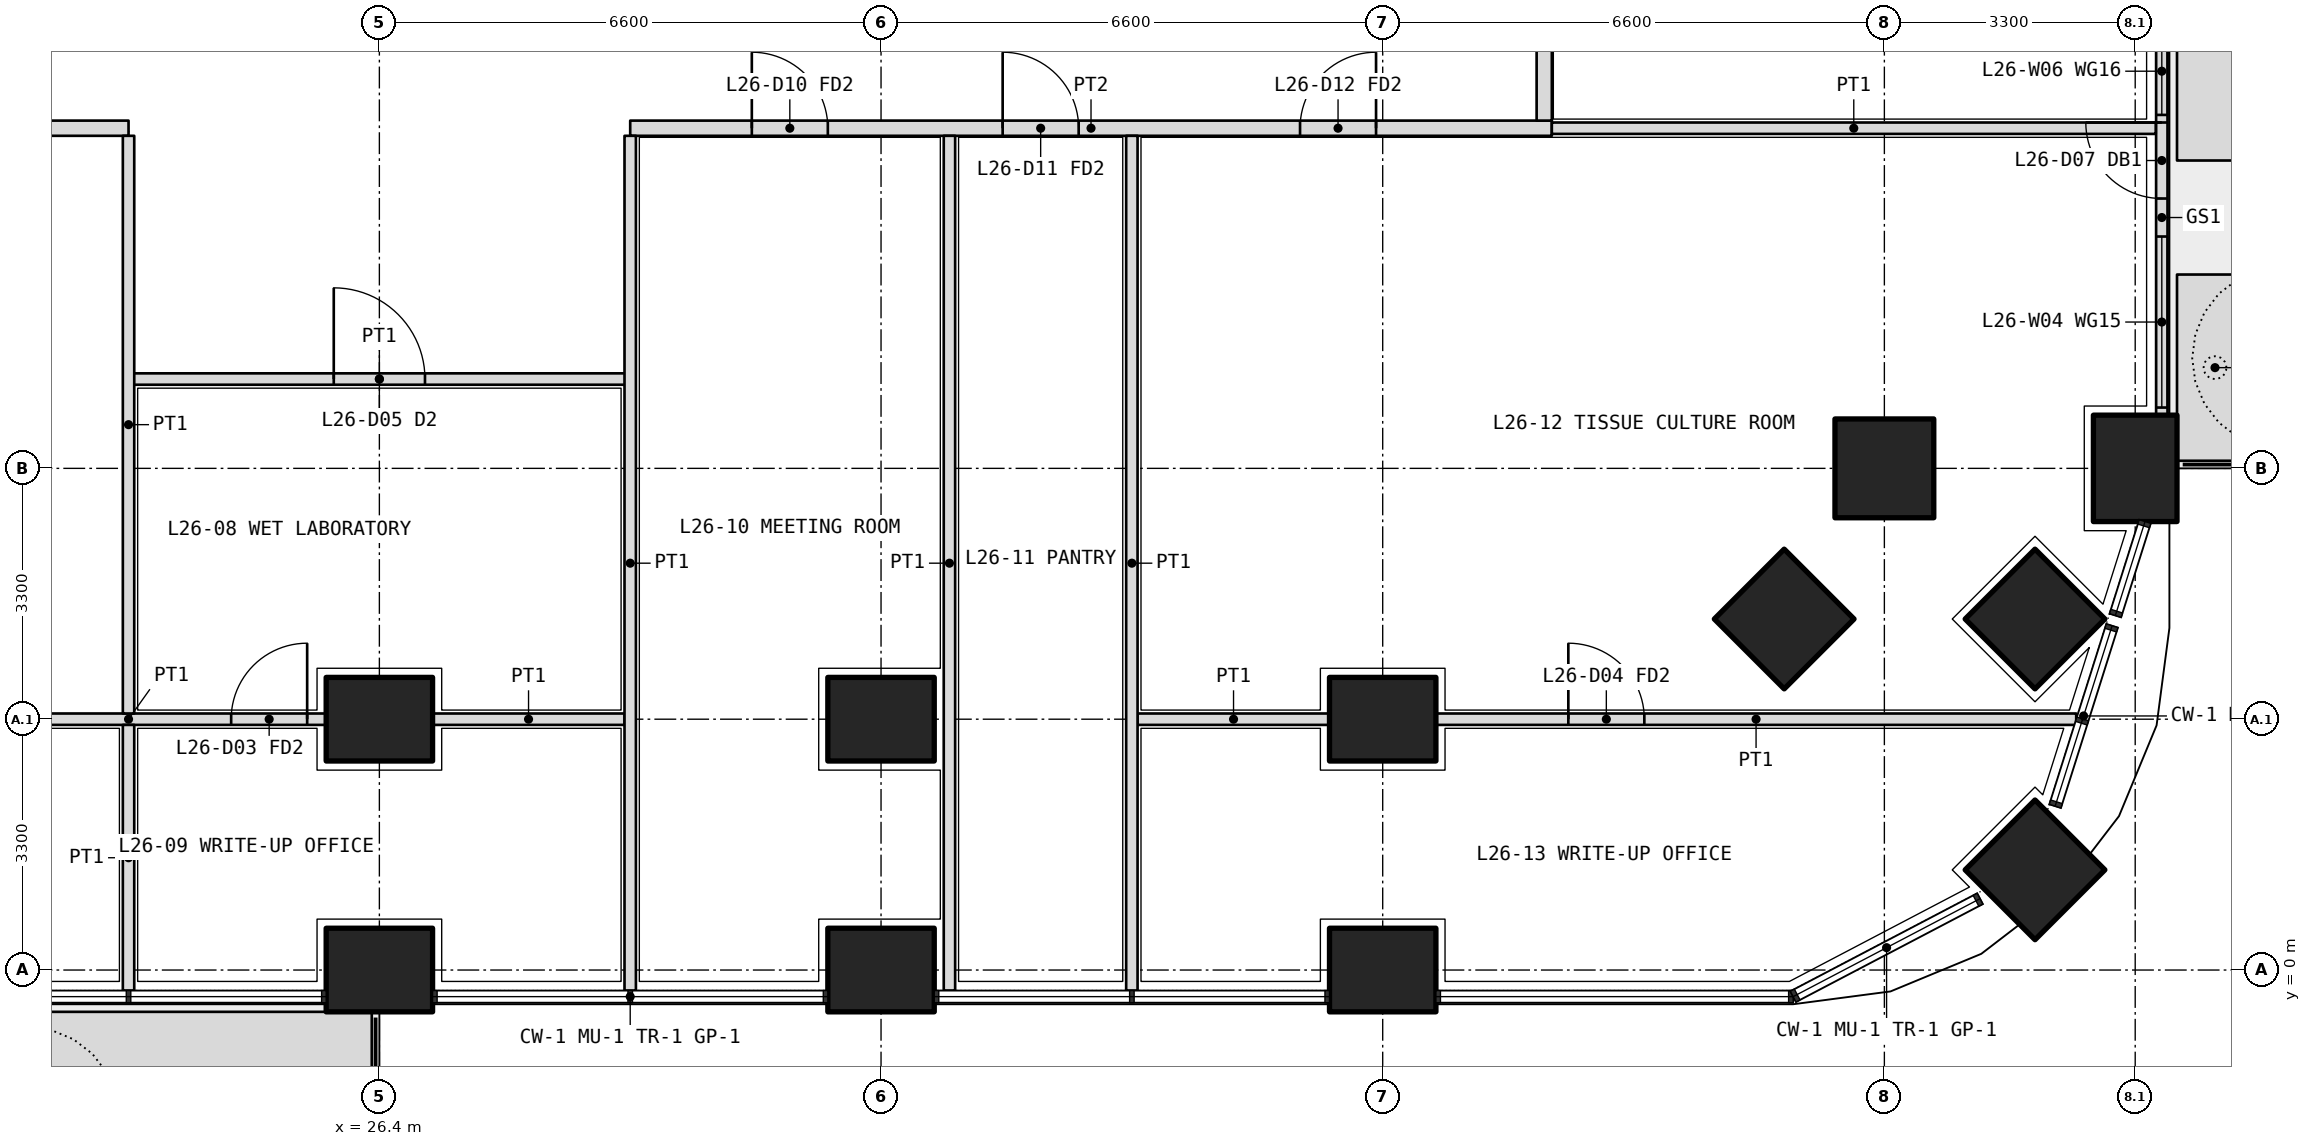
"""IFC4 building model, lengths in metres.
Left out: names, types, materials, properties, quantities, classifications, styles, units other than length and angle.
Written with IfcOpenShell. Run it as: python <this file> out.ifc"""

import sys

from ifc_helpers import new_model, si_unit, direction, frame, frame_2d, origin, origin_2d, place, context, subcontext, project, spatial, polyline, rectangle, outline, extrude, element, fill, save


model = new_model("IFC4")
c1 = context("Model", 3, precision=1e-05, world=origin(), true_north=direction((0.0, 1.0)))
c2 = subcontext(c1, "Body", "Model", "MODEL_VIEW")
j1 = project(units=[si_unit("LENGTHUNIT", "METRE"), si_unit("PLANEANGLEUNIT", "RADIAN")], contexts=[c1])
p1 = place(None, origin())
s1 = spatial("IfcSite", under=j1, at=p1, CompositionType="ELEMENT")
p2 = place(p1, origin())
s2 = spatial("IfcBuilding", under=s1, at=p2, CompositionType="ELEMENT")
p3 = place(p2, frame((0.0, 0.0, 115.8)))
s3 = spatial("IfcBuildingStorey", under=s2, at=p3, CompositionType="ELEMENT", Elevation=115.8)
p4 = place(p3, frame((48.182, 1.318, 0.0), z_axis=(0.0, 0.0, 1.0), x_axis=(0.707106781187, 0.707106781187, 0.0)))
e1 = element("IfcColumn", 1, at=p4, inside=s3, PredefinedType="COLUMN", context=c2, shape_type="SweptSolid", body=[
    extrude(rectangle(XDim=1.3, YDim=1.3, at=origin_2d()), origin(), (0.0, 0.0, 1.0), 4.2),
])
for number, where, z_axis, x_axis in (
    (2, (26.4, 0.0, 0.0), (0.0, 0.0, 1.0), (1.0, 0.0, 0.0)),
    (3, (33.0, 0.0, 0.0), (0.0, 0.0, 1.0), (1.0, 0.0, 0.0)),
    (4, (39.6, 0.0, 0.0), (0.0, 0.0, 1.0), (1.0, 0.0, 0.0)),
    (5, (49.5, 6.6, 0.0), (0.0, 0.0, 1.0), (0.0, 1.0, 0.0)),
):
    element("IfcColumn", number, at=place(p3, frame(where, z_axis=z_axis, x_axis=x_axis)), inside=s3, PredefinedType="COLUMN", context=c2, shape_type="SweptSolid", body=[
        extrude(rectangle(XDim=1.4, YDim=1.1, at=origin_2d()), origin(), (0.0, 0.0, 1.0), 4.2),
    ])
for number, where, z_axis, x_axis in (
    (6, (46.2, 6.6, 0.0), (0.0, 0.0, 1.0), (1.0, 0.0, 0.0)),
    (7, (48.182, 4.618, 0.0), (0.0, 0.0, 1.0), (0.707, 0.707, 0.0)),
):
    element("IfcColumn", number, at=place(p3, frame(where, z_axis=z_axis, x_axis=x_axis)), inside=s3, PredefinedType="COLUMN", context=c2, shape_type="SweptSolid", body=[
        extrude(rectangle(XDim=1.3, YDim=1.3, at=origin_2d()), origin(), (0.0, 0.0, 1.0), 4.2),
    ])
for number, where, z_axis, x_axis in (
    (8, (26.4, 3.3, 0.0), (0.0, 0.0, 1.0), (1.0, 0.0, 0.0)),
    (9, (33.0, 3.3, 0.0), (0.0, 0.0, 1.0), (1.0, 0.0, 0.0)),
    (10, (39.6, 3.3, 0.0), (0.0, 0.0, 1.0), (1.0, 0.0, 0.0)),
):
    element("IfcColumn", number, at=place(p3, frame(where, z_axis=z_axis, x_axis=x_axis)), inside=s3, PredefinedType="COLUMN", context=c2, shape_type="SweptSolid", body=[
        extrude(rectangle(XDim=1.4, YDim=1.1, at=origin_2d()), origin(), (0.0, 0.0, 1.0), 4.2),
    ])
p5 = place(p3, frame((44.882, 4.618, 0.0), z_axis=(0.0, 0.0, 1.0), x_axis=(0.707106781187, 0.707106781187, 0.0)))
e11 = element("IfcColumn", 11, at=p5, inside=s3, PredefinedType="COLUMN", context=c2, shape_type="SweptSolid", body=[
    extrude(rectangle(XDim=1.3, YDim=1.3, at=origin_2d()), origin(), (0.0, 0.0, 1.0), 4.2),
])
p6 = place(p3, origin())
e12 = element("IfcWall", 12, at=p6, inside=s3, PredefinedType="USERDEFINED", context=c2, shape_type="SweptSolid", body=[
    extrude(outline(polyline([(17.25, -1.55), (26.3, -1.55), (26.3, -0.55), (17.25, -0.55), (17.25, -1.55)]), holes=[polyline([(17.4, -1.4), (26.15, -1.4), (26.15, -0.7), (17.4, -0.7), (17.4, -1.4)])]), origin(), (0.0, 0.0, 1.0), 1.05),
])
p7 = place(p3, origin())
e13 = element("IfcWall", 13, at=p7, inside=s3, PredefinedType="USERDEFINED", context=c2, shape_type="SweptSolid", body=[
    extrude(outline(polyline([(50.05, 6.7), (51.05, 6.7), (51.05, 9.15), (50.05, 9.15), (50.05, 6.7)]), holes=[polyline([(50.2, 6.85), (50.9, 6.85), (50.9, 9.0), (50.2, 9.0), (50.2, 6.85)])]), origin(), (0.0, 0.0, 1.0), 1.05),
])
p8 = place(p3, origin())
e14 = element("IfcWall", 14, at=p8, inside=s3, PredefinedType="USERDEFINED", context=c2, shape_type="SweptSolid", body=[
    extrude(outline(polyline([(50.05, 10.65), (51.05, 10.65), (51.05, 19.7), (50.05, 19.7), (50.05, 10.65)]), holes=[polyline([(50.2, 10.8), (50.9, 10.8), (50.9, 19.55), (50.2, 19.55), (50.2, 10.8)])]), origin(), (0.0, 0.0, 1.0), 1.05),
])
p9 = place(p3, frame((49.85, 7.3, 0.0), z_axis=(0.0, 0.0, 1.0), x_axis=(0.0, 1.0, 0.0)))
e15 = element("IfcWall", 15, at=p9, inside=s3, PredefinedType="SOLIDWALL", context=c2, shape_type="SweptSolid", body=[
    extrude(rectangle(XDim=5.2, YDim=0.15, at=frame_2d((2.6, 0.0))), origin(), (0.0, 0.0, 1.0), 2.7),
])
p10 = place(p9, frame((2.85, 0.0, 0.0)))
e16 = element("IfcOpeningElement", 16, at=p10, cuts=e15, PredefinedType="OPENING", context=c2, shape_type="SweptSolid", body=[
    extrude(rectangle(XDim=1.0, YDim=2.4, at=frame_2d((0.5, 1.2))), frame((0.0, 0.085, 0.0), z_axis=(0.0, -1.0, 0.0), x_axis=(1.0, 0.0, 0.0)), (0.0, 0.0, 1.0), 0.17),
])
p11 = place(p9, frame((0.1, 0.0, 0.1)))
e17 = element("IfcOpeningElement", 17, at=p11, cuts=e15, PredefinedType="OPENING", context=c2, shape_type="SweptSolid", body=[
    extrude(rectangle(XDim=2.25, YDim=2.3, at=frame_2d((1.125, 1.15))), frame((0.0, 0.085, 0.0), z_axis=(0.0, -1.0, 0.0), x_axis=(1.0, 0.0, 0.0)), (0.0, 0.0, 1.0), 0.17),
])
p12 = place(p9, frame((3.95, 0.0, 0.1)))
e18 = element("IfcOpeningElement", 18, at=p12, cuts=e15, PredefinedType="OPENING", context=c2, shape_type="SweptSolid", body=[
    extrude(rectangle(XDim=1.15, YDim=2.3, at=frame_2d((0.575, 1.15))), frame((0.0, 0.085, 0.0), z_axis=(0.0, -1.0, 0.0), x_axis=(1.0, 0.0, 0.0)), (0.0, 0.0, 1.0), 0.17),
])
p13 = place(p3, frame((10.975, 11.075, 0.0), z_axis=(0.0, 0.0, 1.0), x_axis=(1.0, 0.0, 0.0)))
e19 = element("IfcWall", 19, at=p13, inside=s3, PredefinedType="PARTITIONING", context=c2, shape_type="SweptSolid", body=[
    extrude(rectangle(XDim=12.125, YDim=0.2, at=frame_2d((6.062, 0.0))), origin(), (0.0, 0.0, 1.0), 2.85),
])
p14 = place(p13, frame((0.663, 0.0, 0.0)))
e20 = element("IfcOpeningElement", 20, at=p14, cuts=e19, PredefinedType="OPENING", context=c2, shape_type="SweptSolid", body=[
    extrude(rectangle(XDim=1.0, YDim=2.1, at=frame_2d((0.5, 1.05))), frame((0.0, 0.11, 0.0), z_axis=(0.0, -1.0, 0.0), x_axis=(1.0, 0.0, 0.0)), (0.0, 0.0, 1.0), 0.22),
])
p15 = place(p13, frame((6.675, 0.0, 0.0)))
e21 = element("IfcOpeningElement", 21, at=p15, cuts=e19, PredefinedType="OPENING", context=c2, shape_type="SweptSolid", body=[
    extrude(rectangle(XDim=1.0, YDim=2.1, at=frame_2d((0.5, 1.05))), frame((0.0, 0.11, 0.0), z_axis=(0.0, -1.0, 0.0), x_axis=(1.0, 0.0, 0.0)), (0.0, 0.0, 1.0), 0.22),
])
p16 = place(p3, frame((29.7, 11.075, 0.0), z_axis=(0.0, 0.0, 1.0), x_axis=(1.0, 0.0, 0.0)))
e22 = element("IfcWall", 22, at=p16, inside=s3, PredefinedType="PARTITIONING", context=c2, shape_type="SweptSolid", body=[
    extrude(rectangle(XDim=12.125, YDim=0.2, at=frame_2d((6.062, 0.0))), origin(), (0.0, 0.0, 1.0), 2.85),
])
p17 = place(p16, frame((1.6, 0.0, 0.0)))
e23 = element("IfcOpeningElement", 23, at=p17, cuts=e22, PredefinedType="OPENING", context=c2, shape_type="SweptSolid", body=[
    extrude(rectangle(XDim=1.0, YDim=2.1, at=frame_2d((0.5, 1.05))), frame((0.0, 0.11, 0.0), z_axis=(0.0, -1.0, 0.0), x_axis=(1.0, 0.0, 0.0)), (0.0, 0.0, 1.0), 0.22),
])
p18 = place(p16, frame((4.9, 0.0, 0.0)))
e24 = element("IfcOpeningElement", 24, at=p18, cuts=e22, PredefinedType="OPENING", context=c2, shape_type="SweptSolid", body=[
    extrude(rectangle(XDim=1.0, YDim=2.1, at=frame_2d((0.5, 1.05))), frame((0.0, 0.11, 0.0), z_axis=(0.0, -1.0, 0.0), x_axis=(1.0, 0.0, 0.0)), (0.0, 0.0, 1.0), 0.22),
])
p19 = place(p16, frame((8.812, 0.0, 0.0)))
e25 = element("IfcOpeningElement", 25, at=p19, cuts=e22, PredefinedType="OPENING", context=c2, shape_type="SweptSolid", body=[
    extrude(rectangle(XDim=1.0, YDim=2.1, at=frame_2d((0.5, 1.05))), frame((0.0, 0.11, 0.0), z_axis=(0.0, -1.0, 0.0), x_axis=(1.0, 0.0, 0.0)), (0.0, 0.0, 1.0), 0.22),
])
p20 = place(p3, frame((41.725, 11.175, 0.0), z_axis=(0.0, 0.0, 1.0), x_axis=(0.0, 1.0, 0.0)))
e26 = element("IfcWall", 26, at=p20, inside=s3, PredefinedType="PARTITIONING", context=c2, shape_type="SweptSolid", body=[
    extrude(rectangle(XDim=27.625, YDim=0.2, at=frame_2d((13.812, 0.0))), origin(), (0.0, 0.0, 1.0), 2.85),
])
p21 = place(p20, frame((3.762, 0.0, 0.0)))
e27 = element("IfcOpeningElement", 27, at=p21, cuts=e26, PredefinedType="OPENING", context=c2, shape_type="SweptSolid", body=[
    extrude(rectangle(XDim=1.0, YDim=2.1, at=frame_2d((0.5, 1.05))), frame((0.0, 0.11, 0.0), z_axis=(0.0, -1.0, 0.0), x_axis=(1.0, 0.0, 0.0)), (0.0, 0.0, 1.0), 0.22),
])
p22 = place(p20, frame((9.625, 0.0, 0.0)))
e28 = element("IfcOpeningElement", 28, at=p22, cuts=e26, PredefinedType="OPENING", context=c2, shape_type="SweptSolid", body=[
    extrude(rectangle(XDim=1.0, YDim=2.1, at=frame_2d((0.5, 1.05))), frame((0.0, 0.11, 0.0), z_axis=(0.0, -1.0, 0.0), x_axis=(1.0, 0.0, 0.0)), (0.0, 0.0, 1.0), 0.22),
])
p23 = place(p20, frame((12.975, 0.0, 0.0)))
e29 = element("IfcOpeningElement", 29, at=p23, cuts=e26, PredefinedType="OPENING", context=c2, shape_type="SweptSolid", body=[
    extrude(rectangle(XDim=0.9, YDim=2.1, at=frame_2d((0.45, 1.05))), frame((0.0, 0.11, 0.0), z_axis=(0.0, -1.0, 0.0), x_axis=(1.0, 0.0, 0.0)), (0.0, 0.0, 1.0), 0.22),
])
p24 = place(p20, frame((19.675, 0.0, 0.0)))
e30 = element("IfcOpeningElement", 30, at=p24, cuts=e26, PredefinedType="OPENING", context=c2, shape_type="SweptSolid", body=[
    extrude(rectangle(XDim=1.0, YDim=2.1, at=frame_2d((0.5, 1.05))), frame((0.0, 0.11, 0.0), z_axis=(0.0, -1.0, 0.0), x_axis=(1.0, 0.0, 0.0)), (0.0, 0.0, 1.0), 0.22),
])
p25 = place(p20, frame((25.925, 0.0, 0.0)))
e31 = element("IfcOpeningElement", 31, at=p25, cuts=e26, PredefinedType="OPENING", context=c2, shape_type="SweptSolid", body=[
    extrude(rectangle(XDim=1.0, YDim=2.1, at=frame_2d((0.5, 1.05))), frame((0.0, 0.11, 0.0), z_axis=(0.0, -1.0, 0.0), x_axis=(1.0, 0.0, 0.0)), (0.0, 0.0, 1.0), 0.22),
])
p26 = place(p3, frame((49.77, 11.075, 0.0), z_axis=(0.0, 0.0, 1.0), x_axis=(-1.0, 0.0, 0.0)))
e32 = element("IfcWall", 32, at=p26, inside=s3, PredefinedType="PARTITIONING", context=c2, shape_type="SweptSolid", body=[
    extrude(rectangle(XDim=7.945, YDim=0.15, at=frame_2d((3.973, 0.0))), origin(), (0.0, 0.0, 1.0), 2.7),
])
p27 = place(p3, frame((20.5, 3.3, 0.0), z_axis=(0.0, 0.0, 1.0), x_axis=(1.0, 0.0, 0.0)))
e33 = element("IfcWall", 33, at=p27, inside=s3, PredefinedType="PARTITIONING", context=c2, shape_type="SweptSolid", body=[
    extrude(rectangle(XDim=5.2, YDim=0.15, at=frame_2d((2.6, 0.0))), origin(), (0.0, 0.0, 1.0), 3.9),
])
p28 = place(p27, frame((3.95, 0.0, 0.0)))
e34 = element("IfcOpeningElement", 34, at=p28, cuts=e33, PredefinedType="OPENING", context=c2, shape_type="SweptSolid", body=[
    extrude(rectangle(XDim=1.0, YDim=2.1, at=frame_2d((0.5, 1.05))), frame((0.0, 0.085, 0.0), z_axis=(0.0, -1.0, 0.0), x_axis=(1.0, 0.0, 0.0)), (0.0, 0.0, 1.0), 0.17),
])
for number, where, z_axis, x_axis in (
    (35, (27.1, 3.3, 0.0), (0.0, 0.0, 1.0), (1.0, 0.0, 0.0)),
    (36, (36.375, 3.3, 0.0), (0.0, 0.0, 1.0), (1.0, 0.0, 0.0)),
):
    element("IfcWall", number, at=place(p3, frame(where, z_axis=z_axis, x_axis=x_axis)), inside=s3, PredefinedType="PARTITIONING", context=c2, shape_type="SweptSolid", body=[
        extrude(rectangle(XDim=2.525, YDim=0.15, at=frame_2d((1.262, 0.0))), origin(), (0.0, 0.0, 1.0), 3.9),
    ])
p29 = place(p3, frame((40.3, 3.3, 0.0), z_axis=(0.0, 0.0, 1.0), x_axis=(1.0, 0.0, 0.0)))
e37 = element("IfcWall", 37, at=p29, inside=s3, PredefinedType="PARTITIONING", context=c2, shape_type="SweptSolid", body=[
    extrude(rectangle(XDim=8.424, YDim=0.15, at=frame_2d((4.212, 0.0))), origin(), (0.0, 0.0, 1.0), 2.7),
])
p30 = place(p29, frame((1.742, 0.0, 0.0)))
e38 = element("IfcOpeningElement", 38, at=p30, cuts=e37, PredefinedType="OPENING", context=c2, shape_type="SweptSolid", body=[
    extrude(rectangle(XDim=1.0, YDim=2.1, at=frame_2d((0.5, 1.05))), frame((0.0, 0.085, 0.0), z_axis=(0.0, -1.0, 0.0), x_axis=(1.0, 0.0, 0.0)), (0.0, 0.0, 1.0), 0.17),
])
p31 = place(p3, frame((23.1, 7.775, 0.0), z_axis=(0.0, 0.0, 1.0), x_axis=(1.0, 0.0, 0.0)))
e39 = element("IfcWall", 39, at=p31, inside=s3, PredefinedType="PARTITIONING", context=c2, shape_type="SweptSolid", body=[
    extrude(rectangle(XDim=6.6, YDim=0.15, at=frame_2d((3.3, 0.0))), origin(), (0.0, 0.0, 1.0), 2.85),
])
p32 = place(p31, frame((2.7, 0.0, 0.0)))
e40 = element("IfcOpeningElement", 40, at=p32, cuts=e39, PredefinedType="OPENING", context=c2, shape_type="SweptSolid", body=[
    extrude(rectangle(XDim=1.2, YDim=2.1, at=frame_2d((0.6, 1.05))), frame((0.0, 0.085, 0.0), z_axis=(0.0, -1.0, 0.0), x_axis=(1.0, 0.0, 0.0)), (0.0, 0.0, 1.0), 0.17),
])
for number, where, z_axis, x_axis in (
    (41, (33.9, -0.27, 0.0), (0.0, 0.0, 1.0), (0.0, 1.0, 0.0)),
    (42, (36.3, -0.27, 0.0), (0.0, 0.0, 1.0), (0.0, 1.0, 0.0)),
):
    element("IfcWall", number, at=place(p3, frame(where, z_axis=z_axis, x_axis=x_axis)), inside=s3, PredefinedType="PARTITIONING", context=c2, shape_type="SweptSolid", body=[
        extrude(rectangle(XDim=11.245, YDim=0.15, at=frame_2d((5.623, 0.0))), origin(), (0.0, 0.0, 1.0), 2.7),
    ])
p33 = place(p3, frame((23.1, -0.27, 0.0), z_axis=(0.0, 0.0, 1.0), x_axis=(0.0, 1.0, 0.0)))
e43 = element("IfcWall", 43, at=p33, inside=s3, PredefinedType="PARTITIONING", context=c2, shape_type="SweptSolid", body=[
    extrude(rectangle(XDim=3.495, YDim=0.15, at=frame_2d((1.748, 0.0))), origin(), (0.0, 0.0, 1.0), 2.7),
])
p34 = place(p3, frame((23.1, 3.375, 0.0), z_axis=(0.0, 0.0, 1.0), x_axis=(0.0, 1.0, 0.0)))
e44 = element("IfcWall", 44, at=p34, inside=s3, PredefinedType="PARTITIONING", context=c2, shape_type="SweptSolid", body=[
    extrude(rectangle(XDim=7.6, YDim=0.15, at=frame_2d((3.8, 0.0))), origin(), (0.0, 0.0, 1.0), 3.9),
])
p35 = place(p3, frame((29.7, -0.27, 0.0), z_axis=(0.0, 0.0, 1.0), x_axis=(0.0, 1.0, 0.0)))
e45 = element("IfcWall", 45, at=p35, inside=s3, PredefinedType="PARTITIONING", context=c2, shape_type="SweptSolid", body=[
    extrude(rectangle(XDim=11.245, YDim=0.15, at=frame_2d((5.623, 0.0))), origin(), (0.0, 0.0, 1.0), 2.7),
])
p36 = place(p10, origin())
e46 = element("IfcDoor", 46, at=p36, inside=s3, OperationType="SINGLE_SWING_RIGHT", PredefinedType="DOOR", context=c2, shape_type="SweptSolid", body=[
    extrude(rectangle(XDim=1.0, YDim=2.4, at=frame_2d((0.5, 1.2))), frame((0.0, 0.025, 0.0), z_axis=(0.0, -1.0, 0.0), x_axis=(1.0, 0.0, 0.0)), (0.0, 0.0, 1.0), 0.05),
])
fill(e16, e46)
p37 = place(p11, origin())
e47 = element("IfcWindow", 47, at=p37, inside=s3, PartitioningType="SINGLE_PANEL", PredefinedType="WINDOW", context=c2, shape_type="SweptSolid", body=[
    extrude(rectangle(XDim=2.25, YDim=2.3, at=frame_2d((1.125, 1.15))), frame((0.0, 0.03, 0.0), z_axis=(0.0, -1.0, 0.0), x_axis=(1.0, 0.0, 0.0)), (0.0, 0.0, 1.0), 0.06),
])
fill(e17, e47)
p38 = place(p12, origin())
e48 = element("IfcWindow", 48, at=p38, inside=s3, PartitioningType="SINGLE_PANEL", PredefinedType="WINDOW", context=c2, shape_type="SweptSolid", body=[
    extrude(rectangle(XDim=1.15, YDim=2.3, at=frame_2d((0.575, 1.15))), frame((0.0, 0.03, 0.0), z_axis=(0.0, -1.0, 0.0), x_axis=(1.0, 0.0, 0.0)), (0.0, 0.0, 1.0), 0.06),
])
fill(e18, e48)
p39 = place(p32, origin())
e49 = element("IfcDoor", 49, at=p39, inside=s3, OperationType="DOUBLE_DOOR_SINGLE_SWING", PredefinedType="DOOR", context=c2, shape_type="SweptSolid", body=[
    extrude(rectangle(XDim=1.2, YDim=2.1, at=frame_2d((0.6, 1.05))), frame((0.0, 0.025, 0.0), z_axis=(0.0, -1.0, 0.0), x_axis=(1.0, 0.0, 0.0)), (0.0, 0.0, 1.0), 0.05),
])
fill(e40, e49)
p40 = place(p28, origin())
e50 = element("IfcDoor", 50, at=p40, inside=s3, OperationType="SINGLE_SWING_RIGHT", PredefinedType="DOOR", context=c2, shape_type="SweptSolid", body=[
    extrude(rectangle(XDim=1.0, YDim=2.1, at=frame_2d((0.5, 1.05))), frame((0.0, 0.025, 0.0), z_axis=(0.0, -1.0, 0.0), x_axis=(1.0, 0.0, 0.0)), (0.0, 0.0, 1.0), 0.05),
])
fill(e34, e50)
p41 = place(p17, origin())
e51 = element("IfcDoor", 51, at=p41, inside=s3, OperationType="SINGLE_SWING_LEFT", PredefinedType="DOOR", context=c2, shape_type="SweptSolid", body=[
    extrude(rectangle(XDim=1.0, YDim=2.1, at=frame_2d((0.5, 1.05))), frame((0.0, 0.025, 0.0), z_axis=(0.0, -1.0, 0.0), x_axis=(1.0, 0.0, 0.0)), (0.0, 0.0, 1.0), 0.05),
])
fill(e23, e51)
p42 = place(p18, origin())
e52 = element("IfcDoor", 52, at=p42, inside=s3, OperationType="SINGLE_SWING_LEFT", PredefinedType="DOOR", context=c2, shape_type="SweptSolid", body=[
    extrude(rectangle(XDim=1.0, YDim=2.1, at=frame_2d((0.5, 1.05))), frame((0.0, 0.025, 0.0), z_axis=(0.0, -1.0, 0.0), x_axis=(1.0, 0.0, 0.0)), (0.0, 0.0, 1.0), 0.05),
])
fill(e24, e52)
p43 = place(p19, origin())
e53 = element("IfcDoor", 53, at=p43, inside=s3, OperationType="SINGLE_SWING_RIGHT", PredefinedType="DOOR", context=c2, shape_type="SweptSolid", body=[
    extrude(rectangle(XDim=1.0, YDim=2.1, at=frame_2d((0.5, 1.05))), frame((0.0, 0.025, 0.0), z_axis=(0.0, -1.0, 0.0), x_axis=(1.0, 0.0, 0.0)), (0.0, 0.0, 1.0), 0.05),
])
fill(e25, e53)
p44 = place(p30, origin())
e54 = element("IfcDoor", 54, at=p44, inside=s3, OperationType="SINGLE_SWING_LEFT", PredefinedType="DOOR", context=c2, shape_type="SweptSolid", body=[
    extrude(rectangle(XDim=1.0, YDim=2.1, at=frame_2d((0.5, 1.05))), frame((0.0, 0.025, 0.0), z_axis=(0.0, -1.0, 0.0), x_axis=(1.0, 0.0, 0.0)), (0.0, 0.0, 1.0), 0.05),
])
fill(e38, e54)
save(model, sys.argv[1])
